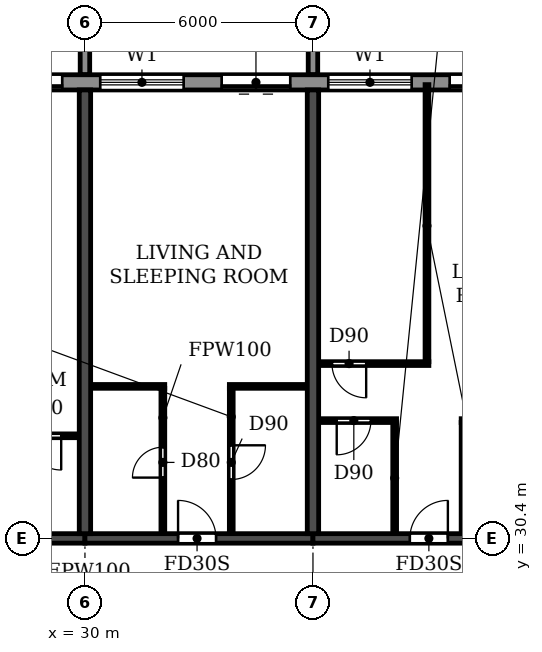
"""IFC4 building model, lengths in metres.
Left out: names, types, materials, properties, quantities, classifications, styles, units other than length and angle.
Written with IfcOpenShell. Run it as: python <this file> out.ifc"""

import sys

from ifc_helpers import new_model, si_unit, direction, frame, frame_2d, origin, place, context, subcontext, project, spatial, polyline, rectangle, outline, extrude, source, transform, mapped, element, fill, save


model = new_model("IFC4")
c1 = context("Model", 3, precision=1e-05, world=origin(), true_north=direction((0.0, 1.0)))
c2 = subcontext(c1, "Body", "Model", "MODEL_VIEW")
j1 = project(units=[si_unit("LENGTHUNIT", "METRE"), si_unit("PLANEANGLEUNIT", "RADIAN")], contexts=[c1])
p1 = place(None, origin())
s1 = spatial("IfcSite", under=j1, at=p1, CompositionType="ELEMENT")
p2 = place(p1, origin())
s2 = spatial("IfcBuilding", under=s1, at=p2, CompositionType="ELEMENT")
p3 = place(p2, frame((0.0, 0.0, 125.7)))
s3 = spatial("IfcBuildingStorey", under=s2, at=p3, CompositionType="ELEMENT", Elevation=125.7)
for number, where, z_axis, x_axis in (
    (1, (30.0, 30.525, 0.0), (0.0, 0.0, 1.0), (0.0, 1.0, 0.0)),
    (2, (36.0, 30.525, 0.0), (0.0, 0.0, 1.0), (0.0, 1.0, 0.0)),
):
    element("IfcWall", number, at=place(p3, frame(where, z_axis=z_axis, x_axis=x_axis)), inside=s3, PredefinedType="SHEAR", context=c2, shape_type="SweptSolid", body=[
        extrude(rectangle(XDim=11.675, YDim=0.3, at=frame_2d((5.837, 0.0))), origin(), (0.0, 0.0, 1.0), 3.07),
    ])
p4 = place(p3, frame((24.0, 30.4, 0.0), z_axis=(0.0, 0.0, 1.0), x_axis=(1.0, 0.0, 0.0)))
e3 = element("IfcWall", 3, at=p4, inside=s3, PredefinedType="SHEAR", context=c2, shape_type="SweptSolid", body=[
    extrude(rectangle(XDim=6.0, YDim=0.25, at=frame_2d((3.0, 0.0))), origin(), (0.0, 0.0, 1.0), 2.47),
])
p5 = place(p4, frame((2.45, 0.0, 0.0)))
e4 = element("IfcOpeningElement", 4, at=p5, cuts=e3, PredefinedType="OPENING", context=c2, shape_type="SweptSolid", body=[
    extrude(rectangle(XDim=1.0, YDim=2.1, at=frame_2d((0.5, 1.05))), frame((0.0, 0.135, 0.0), z_axis=(0.0, -1.0, 0.0), x_axis=(1.0, 0.0, 0.0)), (0.0, 0.0, 1.0), 0.27),
])
p6 = place(p3, frame((30.0, 30.4, 0.0), z_axis=(0.0, 0.0, 1.0), x_axis=(1.0, 0.0, 0.0)))
e5 = element("IfcWall", 5, at=p6, inside=s3, PredefinedType="SHEAR", context=c2, shape_type="SweptSolid", body=[
    extrude(rectangle(XDim=6.0, YDim=0.25, at=frame_2d((3.0, 0.0))), origin(), (0.0, 0.0, 1.0), 2.47),
])
p7 = place(p6, frame((2.45, 0.0, 0.0)))
e6 = element("IfcOpeningElement", 6, at=p7, cuts=e5, PredefinedType="OPENING", context=c2, shape_type="SweptSolid", body=[
    extrude(rectangle(XDim=1.0, YDim=2.1, at=frame_2d((0.5, 1.05))), frame((0.0, 0.135, 0.0), z_axis=(0.0, -1.0, 0.0), x_axis=(1.0, 0.0, 0.0)), (0.0, 0.0, 1.0), 0.27),
])
p8 = place(p3, frame((36.0, 30.4, 0.0), z_axis=(0.0, 0.0, 1.0), x_axis=(1.0, 0.0, 0.0)))
e7 = element("IfcWall", 7, at=p8, inside=s3, PredefinedType="SHEAR", context=c2, shape_type="SweptSolid", body=[
    extrude(rectangle(XDim=6.0, YDim=0.25, at=frame_2d((3.0, 0.0))), origin(), (0.0, 0.0, 1.0), 2.47),
])
p9 = place(p8, frame((2.55, 0.0, 0.0)))
e8 = element("IfcOpeningElement", 8, at=p9, cuts=e7, PredefinedType="OPENING", context=c2, shape_type="SweptSolid", body=[
    extrude(rectangle(XDim=1.0, YDim=2.1, at=frame_2d((0.5, 1.05))), frame((0.0, 0.135, 0.0), z_axis=(0.0, -1.0, 0.0), x_axis=(1.0, 0.0, 0.0)), (0.0, 0.0, 1.0), 0.27),
])
p10 = place(p3, frame((85.317, 42.4, 0.0), z_axis=(0.0, 0.0, 1.0), x_axis=(-1.0, 0.0, 0.0)))
e9 = element("IfcWall", 9, at=p10, inside=s3, PredefinedType="STANDARD", context=c2, shape_type="SweptSolid", body=[
    extrude(rectangle(XDim=68.634, YDim=0.4, at=frame_2d((34.317, 0.0))), origin(), (0.0, 0.0, 1.0), 3.07),
])
p11 = place(p10, frame((64.717, 0.0, 0.9)))
e10 = element("IfcOpeningElement", 10, at=p11, cuts=e9, PredefinedType="OPENING", context=c2, shape_type="SweptSolid", body=[
    extrude(rectangle(XDim=2.2, YDim=1.5, at=frame_2d((1.1, 0.75))), frame((0.0, 0.21, 0.0), z_axis=(0.0, -1.0, 0.0), x_axis=(1.0, 0.0, 0.0)), (0.0, 0.0, 1.0), 0.42),
])
p12 = place(p10, frame((61.917, 0.0, 0.0)))
e11 = element("IfcOpeningElement", 11, at=p12, cuts=e9, PredefinedType="OPENING", context=c2, shape_type="SweptSolid", body=[
    extrude(rectangle(XDim=1.8, YDim=2.4, at=frame_2d((0.9, 1.2))), frame((0.0, 0.21, 0.0), z_axis=(0.0, -1.0, 0.0), x_axis=(1.0, 0.0, 0.0)), (0.0, 0.0, 1.0), 0.42),
])
p13 = place(p10, frame((58.717, 0.0, 0.9)))
e12 = element("IfcOpeningElement", 12, at=p13, cuts=e9, PredefinedType="OPENING", context=c2, shape_type="SweptSolid", body=[
    extrude(rectangle(XDim=2.2, YDim=1.5, at=frame_2d((1.1, 0.75))), frame((0.0, 0.21, 0.0), z_axis=(0.0, -1.0, 0.0), x_axis=(1.0, 0.0, 0.0)), (0.0, 0.0, 1.0), 0.42),
])
p14 = place(p10, frame((55.917, 0.0, 0.0)))
e13 = element("IfcOpeningElement", 13, at=p14, cuts=e9, PredefinedType="OPENING", context=c2, shape_type="SweptSolid", body=[
    extrude(rectangle(XDim=1.8, YDim=2.4, at=frame_2d((0.9, 1.2))), frame((0.0, 0.21, 0.0), z_axis=(0.0, -1.0, 0.0), x_axis=(1.0, 0.0, 0.0)), (0.0, 0.0, 1.0), 0.42),
])
p15 = place(p10, frame((52.717, 0.0, 0.9)))
e14 = element("IfcOpeningElement", 14, at=p15, cuts=e9, PredefinedType="OPENING", context=c2, shape_type="SweptSolid", body=[
    extrude(rectangle(XDim=2.2, YDim=1.5, at=frame_2d((1.1, 0.75))), frame((0.0, 0.21, 0.0), z_axis=(0.0, -1.0, 0.0), x_axis=(1.0, 0.0, 0.0)), (0.0, 0.0, 1.0), 0.42),
])
p16 = place(p10, frame((49.917, 0.0, 0.0)))
e15 = element("IfcOpeningElement", 15, at=p16, cuts=e9, PredefinedType="OPENING", context=c2, shape_type="SweptSolid", body=[
    extrude(rectangle(XDim=1.8, YDim=2.4, at=frame_2d((0.9, 1.2))), frame((0.0, 0.21, 0.0), z_axis=(0.0, -1.0, 0.0), x_axis=(1.0, 0.0, 0.0)), (0.0, 0.0, 1.0), 0.42),
])
p17 = place(p10, frame((46.717, 0.0, 0.9)))
e16 = element("IfcOpeningElement", 16, at=p17, cuts=e9, PredefinedType="OPENING", context=c2, shape_type="SweptSolid", body=[
    extrude(rectangle(XDim=2.2, YDim=1.5, at=frame_2d((1.1, 0.75))), frame((0.0, 0.21, 0.0), z_axis=(0.0, -1.0, 0.0), x_axis=(1.0, 0.0, 0.0)), (0.0, 0.0, 1.0), 0.42),
])
p18 = place(p10, frame((43.917, 0.0, 0.0)))
e17 = element("IfcOpeningElement", 17, at=p18, cuts=e9, PredefinedType="OPENING", context=c2, shape_type="SweptSolid", body=[
    extrude(rectangle(XDim=1.8, YDim=2.4, at=frame_2d((0.9, 1.2))), frame((0.0, 0.21, 0.0), z_axis=(0.0, -1.0, 0.0), x_axis=(1.0, 0.0, 0.0)), (0.0, 0.0, 1.0), 0.42),
])
p19 = place(p10, frame((40.717, 0.0, 0.9)))
e18 = element("IfcOpeningElement", 18, at=p19, cuts=e9, PredefinedType="OPENING", context=c2, shape_type="SweptSolid", body=[
    extrude(rectangle(XDim=2.2, YDim=1.5, at=frame_2d((1.1, 0.75))), frame((0.0, 0.21, 0.0), z_axis=(0.0, -1.0, 0.0), x_axis=(1.0, 0.0, 0.0)), (0.0, 0.0, 1.0), 0.42),
])
p20 = place(p10, frame((37.717, 0.0, 0.9)))
e19 = element("IfcOpeningElement", 19, at=p20, cuts=e9, PredefinedType="OPENING", context=c2, shape_type="SweptSolid", body=[
    extrude(rectangle(XDim=2.2, YDim=1.5, at=frame_2d((1.1, 0.75))), frame((0.0, 0.21, 0.0), z_axis=(0.0, -1.0, 0.0), x_axis=(1.0, 0.0, 0.0)), (0.0, 0.0, 1.0), 0.42),
])
p21 = place(p10, frame((34.917, 0.0, 0.0)))
e20 = element("IfcOpeningElement", 20, at=p21, cuts=e9, PredefinedType="OPENING", context=c2, shape_type="SweptSolid", body=[
    extrude(rectangle(XDim=1.8, YDim=2.4, at=frame_2d((0.9, 1.2))), frame((0.0, 0.21, 0.0), z_axis=(0.0, -1.0, 0.0), x_axis=(1.0, 0.0, 0.0)), (0.0, 0.0, 1.0), 0.42),
])
p22 = place(p10, frame((31.717, 0.0, 0.9)))
e21 = element("IfcOpeningElement", 21, at=p22, cuts=e9, PredefinedType="OPENING", context=c2, shape_type="SweptSolid", body=[
    extrude(rectangle(XDim=2.2, YDim=1.5, at=frame_2d((1.1, 0.75))), frame((0.0, 0.21, 0.0), z_axis=(0.0, -1.0, 0.0), x_axis=(1.0, 0.0, 0.0)), (0.0, 0.0, 1.0), 0.42),
])
p23 = place(p10, frame((28.717, 0.0, 0.9)))
e22 = element("IfcOpeningElement", 22, at=p23, cuts=e9, PredefinedType="OPENING", context=c2, shape_type="SweptSolid", body=[
    extrude(rectangle(XDim=2.2, YDim=1.5, at=frame_2d((1.1, 0.75))), frame((0.0, 0.21, 0.0), z_axis=(0.0, -1.0, 0.0), x_axis=(1.0, 0.0, 0.0)), (0.0, 0.0, 1.0), 0.42),
])
p24 = place(p10, frame((25.717, 0.0, 0.9)))
e23 = element("IfcOpeningElement", 23, at=p24, cuts=e9, PredefinedType="OPENING", context=c2, shape_type="SweptSolid", body=[
    extrude(rectangle(XDim=2.2, YDim=1.5, at=frame_2d((1.1, 0.75))), frame((0.0, 0.21, 0.0), z_axis=(0.0, -1.0, 0.0), x_axis=(1.0, 0.0, 0.0)), (0.0, 0.0, 1.0), 0.42),
])
p25 = place(p10, frame((22.717, 0.0, 0.9)))
e24 = element("IfcOpeningElement", 24, at=p25, cuts=e9, PredefinedType="OPENING", context=c2, shape_type="SweptSolid", body=[
    extrude(rectangle(XDim=2.2, YDim=1.5, at=frame_2d((1.1, 0.75))), frame((0.0, 0.21, 0.0), z_axis=(0.0, -1.0, 0.0), x_axis=(1.0, 0.0, 0.0)), (0.0, 0.0, 1.0), 0.42),
])
p26 = place(p10, frame((19.917, 0.0, 0.0)))
e25 = element("IfcOpeningElement", 25, at=p26, cuts=e9, PredefinedType="OPENING", context=c2, shape_type="SweptSolid", body=[
    extrude(rectangle(XDim=1.8, YDim=2.4, at=frame_2d((0.9, 1.2))), frame((0.0, 0.21, 0.0), z_axis=(0.0, -1.0, 0.0), x_axis=(1.0, 0.0, 0.0)), (0.0, 0.0, 1.0), 0.42),
])
p27 = place(p10, frame((16.917, 0.0, 0.0)))
e26 = element("IfcOpeningElement", 26, at=p27, cuts=e9, PredefinedType="OPENING", context=c2, shape_type="SweptSolid", body=[
    extrude(rectangle(XDim=1.8, YDim=2.4, at=frame_2d((0.9, 1.2))), frame((0.0, 0.21, 0.0), z_axis=(0.0, -1.0, 0.0), x_axis=(1.0, 0.0, 0.0)), (0.0, 0.0, 1.0), 0.42),
])
p28 = place(p10, frame((13.717, 0.0, 0.9)))
e27 = element("IfcOpeningElement", 27, at=p28, cuts=e9, PredefinedType="OPENING", context=c2, shape_type="SweptSolid", body=[
    extrude(rectangle(XDim=2.2, YDim=1.5, at=frame_2d((1.1, 0.75))), frame((0.0, 0.21, 0.0), z_axis=(0.0, -1.0, 0.0), x_axis=(1.0, 0.0, 0.0)), (0.0, 0.0, 1.0), 0.42),
])
p29 = place(p10, frame((10.717, 0.0, 0.9)))
e28 = element("IfcOpeningElement", 28, at=p29, cuts=e9, PredefinedType="OPENING", context=c2, shape_type="SweptSolid", body=[
    extrude(rectangle(XDim=2.2, YDim=1.5, at=frame_2d((1.1, 0.75))), frame((0.0, 0.21, 0.0), z_axis=(0.0, -1.0, 0.0), x_axis=(1.0, 0.0, 0.0)), (0.0, 0.0, 1.0), 0.42),
])
p30 = place(p10, frame((7.717, 0.0, 0.9)))
e29 = element("IfcOpeningElement", 29, at=p30, cuts=e9, PredefinedType="OPENING", context=c2, shape_type="SweptSolid", body=[
    extrude(rectangle(XDim=2.2, YDim=1.5, at=frame_2d((1.1, 0.75))), frame((0.0, 0.21, 0.0), z_axis=(0.0, -1.0, 0.0), x_axis=(1.0, 0.0, 0.0)), (0.0, 0.0, 1.0), 0.42),
])
p31 = place(p10, frame((4.917, 0.0, 0.0)))
e30 = element("IfcOpeningElement", 30, at=p31, cuts=e9, PredefinedType="OPENING", context=c2, shape_type="SweptSolid", body=[
    extrude(rectangle(XDim=1.8, YDim=2.4, at=frame_2d((0.9, 1.2))), frame((0.0, 0.21, 0.0), z_axis=(0.0, -1.0, 0.0), x_axis=(1.0, 0.0, 0.0)), (0.0, 0.0, 1.0), 0.42),
])
p32 = place(p10, frame((1.717, 0.0, 0.9)))
e31 = element("IfcOpeningElement", 31, at=p32, cuts=e9, PredefinedType="OPENING", context=c2, shape_type="SweptSolid", body=[
    extrude(rectangle(XDim=2.2, YDim=1.5, at=frame_2d((1.1, 0.75))), frame((0.0, 0.21, 0.0), z_axis=(0.0, -1.0, 0.0), x_axis=(1.0, 0.0, 0.0)), (0.0, 0.0, 1.0), 0.42),
])
m1 = source(origin(), c2, "Body", "SweptSolid", [
    extrude(outline(polyline([(0.0, 0.0), (0.25, 0.0), (0.25, 3.1), (0.0, 3.1), (0.0, 0.0)])), origin(), (0.0, 0.0, 1.0), 3.1),
])
for number, where in (
    (32, (29.875, 42.6, 0.0)),
    (33, (35.875, 42.6, 0.0)),
):
    element("IfcWall", number, at=place(p3, frame(where)), inside=s3, PredefinedType="STANDARD", context=c2, shape_type="MappedRepresentation", body=[
        mapped(m1, transform((0.0, 0.0, 0.0))),
    ])
p33 = place(p3, frame((27.8, 33.1, 0.0), z_axis=(0.0, 0.0, 1.0), x_axis=(1.0, 0.0, 0.0)))
e34 = element("IfcWall", 34, at=p33, inside=s3, PredefinedType="PARTITIONING", context=c2, shape_type="SweptSolid", body=[
    extrude(rectangle(XDim=2.04, YDim=0.1, at=frame_2d((1.02, 0.0))), origin(), (0.0, 0.0, 1.0), 3.07),
])
p34 = place(p33, frame((0.675, 0.0, 0.0)))
e35 = element("IfcOpeningElement", 35, at=p34, cuts=e34, PredefinedType="OPENING", context=c2, shape_type="SweptSolid", body=[
    extrude(rectangle(XDim=0.9, YDim=2.1, at=frame_2d((0.45, 1.05))), frame((0.0, 0.06, 0.0), z_axis=(0.0, -1.0, 0.0), x_axis=(1.0, 0.0, 0.0)), (0.0, 0.0, 1.0), 0.12),
])
p35 = place(p3, frame((36.16, 33.5, 0.0), z_axis=(0.0, 0.0, 1.0), x_axis=(1.0, 0.0, 0.0)))
e36 = element("IfcWall", 36, at=p35, inside=s3, PredefinedType="PARTITIONING", context=c2, shape_type="SweptSolid", body=[
    extrude(rectangle(XDim=2.04, YDim=0.1, at=frame_2d((1.02, 0.0))), origin(), (0.0, 0.0, 1.0), 3.07),
])
p36 = place(p35, frame((0.465, 0.0, 0.0)))
e37 = element("IfcOpeningElement", 37, at=p36, cuts=e36, PredefinedType="OPENING", context=c2, shape_type="SweptSolid", body=[
    extrude(rectangle(XDim=0.9, YDim=2.1, at=frame_2d((0.45, 1.05))), frame((0.0, 0.06, 0.0), z_axis=(0.0, -1.0, 0.0), x_axis=(1.0, 0.0, 0.0)), (0.0, 0.0, 1.0), 0.12),
])
p37 = place(p3, frame((39.9, 33.5, 0.0), z_axis=(0.0, 0.0, 1.0), x_axis=(1.0, 0.0, 0.0)))
e38 = element("IfcWall", 38, at=p37, inside=s3, PredefinedType="PARTITIONING", context=c2, shape_type="SweptSolid", body=[
    extrude(rectangle(XDim=1.94, YDim=0.1, at=frame_2d((0.97, 0.0))), origin(), (0.0, 0.0, 1.0), 3.07),
])
p38 = place(p37, frame((0.675, 0.0, 0.0)))
e39 = element("IfcOpeningElement", 39, at=p38, cuts=e38, PredefinedType="OPENING", context=c2, shape_type="SweptSolid", body=[
    extrude(rectangle(XDim=0.8, YDim=2.1, at=frame_2d((0.4, 1.05))), frame((0.0, 0.06, 0.0), z_axis=(0.0, -1.0, 0.0), x_axis=(1.0, 0.0, 0.0)), (0.0, 0.0, 1.0), 0.12),
])
p39 = place(p3, frame((30.16, 34.4, 0.0), z_axis=(0.0, 0.0, 1.0), x_axis=(1.0, 0.0, 0.0)))
e40 = element("IfcWall", 40, at=p39, inside=s3, PredefinedType="PARTITIONING", context=c2, shape_type="SweptSolid", body=[
    extrude(rectangle(XDim=1.94, YDim=0.1, at=frame_2d((0.97, 0.0))), origin(), (0.0, 0.0, 1.0), 3.07),
])
p40 = place(p3, frame((33.8, 34.4, 0.0), z_axis=(0.0, 0.0, 1.0), x_axis=(1.0, 0.0, 0.0)))
e41 = element("IfcWall", 41, at=p40, inside=s3, PredefinedType="PARTITIONING", context=c2, shape_type="SweptSolid", body=[
    extrude(rectangle(XDim=2.04, YDim=0.1, at=frame_2d((1.02, 0.0))), origin(), (0.0, 0.0, 1.0), 3.07),
])
p41 = place(p3, frame((36.16, 35.0, 0.0), z_axis=(0.0, 0.0, 1.0), x_axis=(1.0, 0.0, 0.0)))
e42 = element("IfcWall", 42, at=p41, inside=s3, PredefinedType="PARTITIONING", context=c2, shape_type="SweptSolid", body=[
    extrude(rectangle(XDim=2.89, YDim=0.1, at=frame_2d((1.445, 0.0))), origin(), (0.0, 0.0, 1.0), 3.07),
])
p42 = place(p41, frame((0.34, 0.0, 0.0)))
e43 = element("IfcOpeningElement", 43, at=p42, cuts=e42, PredefinedType="OPENING", context=c2, shape_type="SweptSolid", body=[
    extrude(rectangle(XDim=0.9, YDim=2.1, at=frame_2d((0.45, 1.05))), frame((0.0, 0.06, 0.0), z_axis=(0.0, -1.0, 0.0), x_axis=(1.0, 0.0, 0.0)), (0.0, 0.0, 1.0), 0.12),
])
p43 = place(p3, frame((32.05, 30.535, 0.0), z_axis=(0.0, 0.0, 1.0), x_axis=(0.0, 1.0, 0.0)))
e44 = element("IfcWall", 44, at=p43, inside=s3, PredefinedType="PARTITIONING", context=c2, shape_type="SweptSolid", body=[
    extrude(rectangle(XDim=3.815, YDim=0.1, at=frame_2d((1.908, 0.0))), origin(), (0.0, 0.0, 1.0), 3.07),
])
p44 = place(p43, frame((1.465, 0.0, 0.0)))
e45 = element("IfcOpeningElement", 45, at=p44, cuts=e44, PredefinedType="OPENING", context=c2, shape_type="SweptSolid", body=[
    extrude(rectangle(XDim=0.8, YDim=2.1, at=frame_2d((0.4, 1.05))), frame((0.0, 0.06, 0.0), z_axis=(0.0, -1.0, 0.0), x_axis=(1.0, 0.0, 0.0)), (0.0, 0.0, 1.0), 0.12),
])
p45 = place(p3, frame((33.85, 30.535, 0.0), z_axis=(0.0, 0.0, 1.0), x_axis=(0.0, 1.0, 0.0)))
e46 = element("IfcWall", 46, at=p45, inside=s3, PredefinedType="PARTITIONING", context=c2, shape_type="SweptSolid", body=[
    extrude(rectangle(XDim=3.815, YDim=0.1, at=frame_2d((1.908, 0.0))), origin(), (0.0, 0.0, 1.0), 3.07),
])
p46 = place(p45, frame((1.415, 0.0, 0.0)))
e47 = element("IfcOpeningElement", 47, at=p46, cuts=e46, PredefinedType="OPENING", context=c2, shape_type="SweptSolid", body=[
    extrude(rectangle(XDim=0.9, YDim=2.1, at=frame_2d((0.45, 1.05))), frame((0.0, 0.06, 0.0), z_axis=(0.0, -1.0, 0.0), x_axis=(1.0, 0.0, 0.0)), (0.0, 0.0, 1.0), 0.12),
])
p47 = place(p3, frame((38.15, 30.535, 0.0), z_axis=(0.0, 0.0, 1.0), x_axis=(0.0, 1.0, 0.0)))
e48 = element("IfcWall", 48, at=p47, inside=s3, PredefinedType="PARTITIONING", context=c2, shape_type="SweptSolid", body=[
    extrude(rectangle(XDim=2.915, YDim=0.1, at=frame_2d((1.458, 0.0))), origin(), (0.0, 0.0, 1.0), 3.07),
])
p48 = place(p3, frame((39.0, 35.05, 0.0), z_axis=(0.0, 0.0, 1.0), x_axis=(0.0, 1.0, 0.0)))
e49 = element("IfcWall", 49, at=p48, inside=s3, PredefinedType="PARTITIONING", context=c2, shape_type="SweptSolid", body=[
    extrude(rectangle(XDim=7.29, YDim=0.1, at=frame_2d((3.645, 0.0))), origin(), (0.0, 0.0, 1.0), 3.07),
])
p49 = place(p3, frame((39.95, 30.535, 0.0), z_axis=(0.0, 0.0, 1.0), x_axis=(0.0, 1.0, 0.0)))
e50 = element("IfcWall", 50, at=p49, inside=s3, PredefinedType="PARTITIONING", context=c2, shape_type="SweptSolid", body=[
    extrude(rectangle(XDim=2.915, YDim=0.1, at=frame_2d((1.458, 0.0))), origin(), (0.0, 0.0, 1.0), 3.07),
])
p50 = place(p14, origin())
e51 = element("IfcDoor", 51, at=p50, inside=s3, OperationType="DOUBLE_DOOR_SLIDING", PredefinedType="DOOR", context=c2, shape_type="SweptSolid", body=[
    extrude(rectangle(XDim=1.8, YDim=2.4, at=frame_2d((0.9, 1.2))), frame((0.0, 0.025, 0.0), z_axis=(0.0, -1.0, 0.0), x_axis=(1.0, 0.0, 0.0)), (0.0, 0.0, 1.0), 0.05),
])
fill(e13, e51)
p51 = place(p15, origin())
e52 = element("IfcWindow", 52, at=p51, inside=s3, PartitioningType="DOUBLE_PANEL_HORIZONTAL", PredefinedType="WINDOW", context=c2, shape_type="SweptSolid", body=[
    extrude(rectangle(XDim=2.2, YDim=1.5, at=frame_2d((1.1, 0.75))), frame((0.0, 0.03, 0.0), z_axis=(0.0, -1.0, 0.0), x_axis=(1.0, 0.0, 0.0)), (0.0, 0.0, 1.0), 0.06),
])
fill(e14, e52)
p52 = place(p16, origin())
e53 = element("IfcDoor", 53, at=p52, inside=s3, OperationType="DOUBLE_DOOR_SLIDING", PredefinedType="DOOR", context=c2, shape_type="SweptSolid", body=[
    extrude(rectangle(XDim=1.8, YDim=2.4, at=frame_2d((0.9, 1.2))), frame((0.0, 0.025, 0.0), z_axis=(0.0, -1.0, 0.0), x_axis=(1.0, 0.0, 0.0)), (0.0, 0.0, 1.0), 0.05),
])
fill(e15, e53)
p53 = place(p17, origin())
e54 = element("IfcWindow", 54, at=p53, inside=s3, PartitioningType="DOUBLE_PANEL_HORIZONTAL", PredefinedType="WINDOW", context=c2, shape_type="SweptSolid", body=[
    extrude(rectangle(XDim=2.2, YDim=1.5, at=frame_2d((1.1, 0.75))), frame((0.0, 0.03, 0.0), z_axis=(0.0, -1.0, 0.0), x_axis=(1.0, 0.0, 0.0)), (0.0, 0.0, 1.0), 0.06),
])
fill(e16, e54)
p54 = place(p18, origin())
e55 = element("IfcDoor", 55, at=p54, inside=s3, OperationType="DOUBLE_DOOR_SLIDING", PredefinedType="DOOR", context=c2, shape_type="SweptSolid", body=[
    extrude(rectangle(XDim=1.8, YDim=2.4, at=frame_2d((0.9, 1.2))), frame((0.0, 0.025, 0.0), z_axis=(0.0, -1.0, 0.0), x_axis=(1.0, 0.0, 0.0)), (0.0, 0.0, 1.0), 0.05),
])
fill(e17, e55)
p55 = place(p34, frame((0.9, 0.0, 0.0), z_axis=(0.0, 0.0, 1.0), x_axis=(-1.0, 0.0, 0.0)))
e56 = element("IfcDoor", 56, at=p55, inside=s3, OperationType="SINGLE_SWING_LEFT", PredefinedType="DOOR", context=c2, shape_type="SweptSolid", body=[
    extrude(rectangle(XDim=0.9, YDim=2.1, at=frame_2d((0.45, 1.05))), frame((0.0, 0.025, 0.0), z_axis=(0.0, -1.0, 0.0), x_axis=(1.0, 0.0, 0.0)), (0.0, 0.0, 1.0), 0.05),
])
fill(e35, e56)
p56 = place(p44, origin())
e57 = element("IfcDoor", 57, at=p56, inside=s3, OperationType="SINGLE_SWING_LEFT", PredefinedType="DOOR", context=c2, shape_type="SweptSolid", body=[
    extrude(rectangle(XDim=0.8, YDim=2.1, at=frame_2d((0.4, 1.05))), frame((0.0, 0.025, 0.0), z_axis=(0.0, -1.0, 0.0), x_axis=(1.0, 0.0, 0.0)), (0.0, 0.0, 1.0), 0.05),
])
fill(e45, e57)
p57 = place(p7, origin())
e58 = element("IfcDoor", 58, at=p57, inside=s3, OperationType="SINGLE_SWING_LEFT", PredefinedType="DOOR", context=c2, shape_type="SweptSolid", body=[
    extrude(rectangle(XDim=1.0, YDim=2.1, at=frame_2d((0.5, 1.05))), frame((0.0, 0.025, 0.0), z_axis=(0.0, -1.0, 0.0), x_axis=(1.0, 0.0, 0.0)), (0.0, 0.0, 1.0), 0.05),
])
fill(e6, e58)
p58 = place(p46, frame((0.9, 0.0, 0.0), z_axis=(0.0, 0.0, 1.0), x_axis=(-1.0, 0.0, 0.0)))
e59 = element("IfcDoor", 59, at=p58, inside=s3, OperationType="SINGLE_SWING_LEFT", PredefinedType="DOOR", context=c2, shape_type="SweptSolid", body=[
    extrude(rectangle(XDim=0.9, YDim=2.1, at=frame_2d((0.45, 1.05))), frame((0.0, 0.025, 0.0), z_axis=(0.0, -1.0, 0.0), x_axis=(1.0, 0.0, 0.0)), (0.0, 0.0, 1.0), 0.05),
])
fill(e47, e59)
p59 = place(p42, frame((0.9, 0.0, 0.0), z_axis=(0.0, 0.0, 1.0), x_axis=(-1.0, 0.0, 0.0)))
e60 = element("IfcDoor", 60, at=p59, inside=s3, OperationType="SINGLE_SWING_LEFT", PredefinedType="DOOR", context=c2, shape_type="SweptSolid", body=[
    extrude(rectangle(XDim=0.9, YDim=2.1, at=frame_2d((0.45, 1.05))), frame((0.0, 0.025, 0.0), z_axis=(0.0, -1.0, 0.0), x_axis=(1.0, 0.0, 0.0)), (0.0, 0.0, 1.0), 0.05),
])
fill(e43, e60)
p60 = place(p36, frame((0.9, 0.0, 0.0), z_axis=(0.0, 0.0, 1.0), x_axis=(-1.0, 0.0, 0.0)))
e61 = element("IfcDoor", 61, at=p60, inside=s3, OperationType="SINGLE_SWING_RIGHT", PredefinedType="DOOR", context=c2, shape_type="SweptSolid", body=[
    extrude(rectangle(XDim=0.9, YDim=2.1, at=frame_2d((0.45, 1.05))), frame((0.0, 0.025, 0.0), z_axis=(0.0, -1.0, 0.0), x_axis=(1.0, 0.0, 0.0)), (0.0, 0.0, 1.0), 0.05),
])
fill(e37, e61)
p61 = place(p9, origin())
e62 = element("IfcDoor", 62, at=p61, inside=s3, OperationType="SINGLE_SWING_RIGHT", PredefinedType="DOOR", context=c2, shape_type="SweptSolid", body=[
    extrude(rectangle(XDim=1.0, YDim=2.1, at=frame_2d((0.5, 1.05))), frame((0.0, 0.025, 0.0), z_axis=(0.0, -1.0, 0.0), x_axis=(1.0, 0.0, 0.0)), (0.0, 0.0, 1.0), 0.05),
])
fill(e8, e62)
save(model, sys.argv[1])
